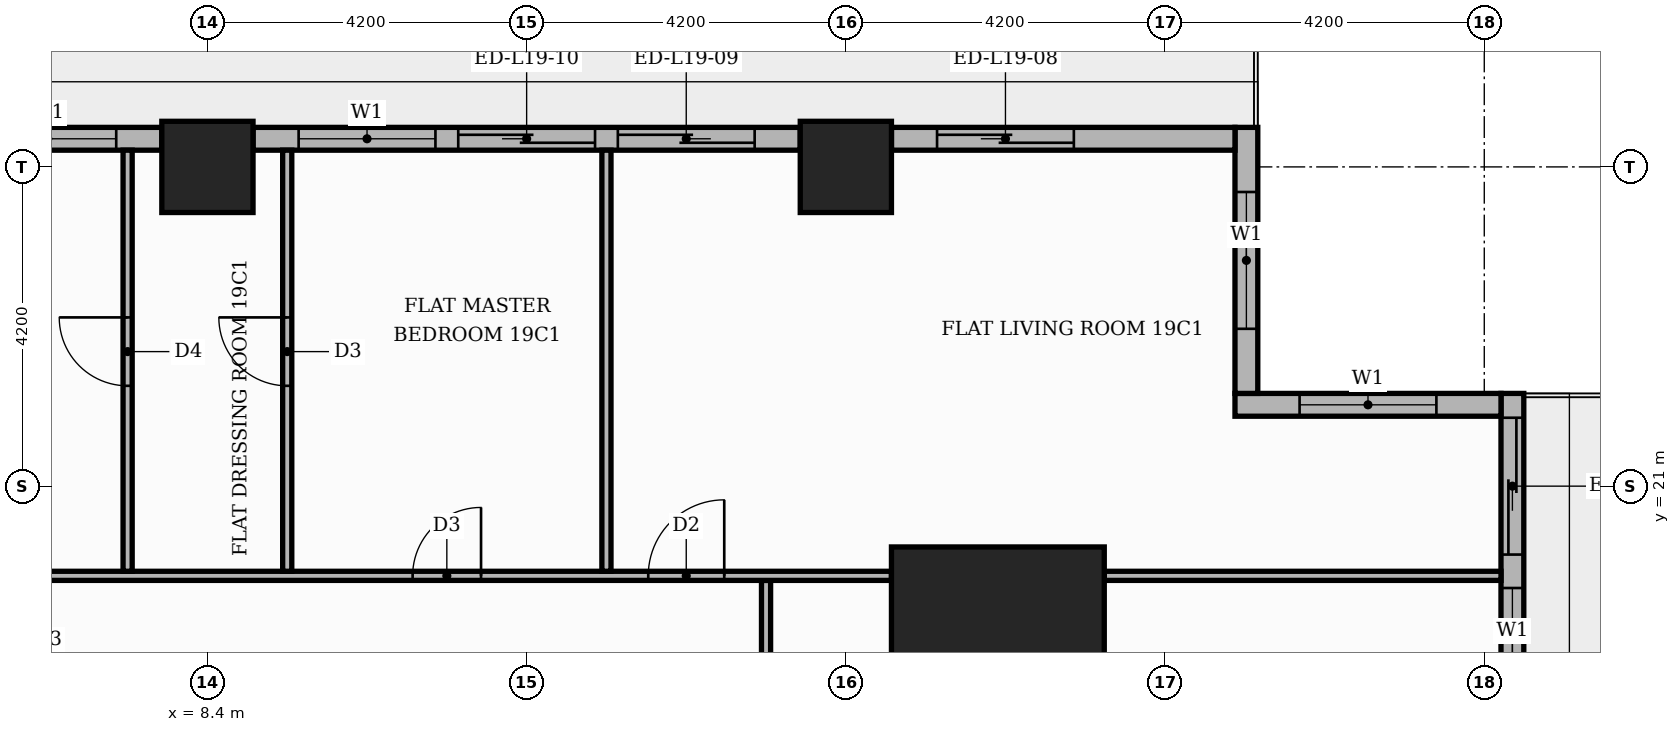
"""IFC4 building model, lengths in metres.
Left out: names, types, materials, properties, quantities, classifications, styles, units other than length and angle.
Written with IfcOpenShell. Run it as: python <this file> out.ifc"""

import sys

from ifc_helpers import new_model, si_unit, direction, frame, frame_2d, origin, origin_2d, place, context, subcontext, project, spatial, rectangle, extrude, element, fill, save


model = new_model("IFC4")
c1 = context("Model", 3, precision=1e-05, world=origin(), true_north=direction((0.0, 1.0)))
c2 = subcontext(c1, "Body", "Model", "MODEL_VIEW")
j1 = project(units=[si_unit("LENGTHUNIT", "METRE"), si_unit("PLANEANGLEUNIT", "RADIAN")], contexts=[c1])
p1 = place(None, origin())
s1 = spatial("IfcSite", under=j1, at=p1, CompositionType="ELEMENT")
p2 = place(p1, origin())
s2 = spatial("IfcBuilding", under=s1, at=p2, CompositionType="ELEMENT")
p3 = place(p2, frame((0.0, 0.0, 83.1)))
s3 = spatial("IfcBuildingStorey", under=s2, at=p3, CompositionType="ELEMENT", Elevation=83.1)
p4 = place(p3, frame((18.8, 18.8, 0.0), z_axis=(0.0, 0.0, 1.0), x_axis=(1.0, 0.0, 0.0)))
e1 = element("IfcColumn", 1, at=p4, inside=s3, PredefinedType="COLUMN", context=c2, shape_type="SweptSolid", body=[
    extrude(rectangle(XDim=2.8, YDim=2.8, at=origin_2d()), origin(), (0.0, 0.0, 1.0), 3.9),
])
for number, where, z_axis, x_axis in (
    (2, (8.4, 25.2, 0.0), (0.0, 0.0, 1.0), (1.0, 0.0, 0.0)),
    (3, (16.8, 25.2, 0.0), (0.0, 0.0, 1.0), (1.0, 0.0, 0.0)),
):
    element("IfcColumn", number, at=place(p3, frame(where, z_axis=z_axis, x_axis=x_axis)), inside=s3, PredefinedType="COLUMN", context=c2, shape_type="SweptSolid", body=[
        extrude(rectangle(XDim=1.2, YDim=1.2, at=origin_2d()), origin(), (0.0, 0.0, 1.0), 3.9),
    ])
p5 = place(p3, frame((25.57, 17.4, 0.0), z_axis=(0.0, 0.0, 1.0), x_axis=(0.0, 1.0, 0.0)))
e4 = element("IfcWall", 4, at=p5, inside=s3, PredefinedType="STANDARD", context=c2, shape_type="SweptSolid", body=[
    extrude(rectangle(XDim=4.82, YDim=0.3, at=frame_2d((2.41, 0.0))), origin(), (0.0, 0.0, 1.0), 3.48),
])
p6 = place(p5, frame((2.7, 0.0, 0.0)))
e5 = element("IfcOpeningElement", 5, at=p6, cuts=e4, PredefinedType="OPENING", context=c2, shape_type="SweptSolid", body=[
    extrude(rectangle(XDim=1.8, YDim=2.4, at=frame_2d((0.9, 1.2))), frame((0.0, 0.16, 0.0), z_axis=(0.0, -1.0, 0.0), x_axis=(1.0, 0.0, 0.0)), (0.0, 0.0, 1.0), 0.32),
])
p7 = place(p5, frame((0.46, 0.0, 0.9)))
e6 = element("IfcOpeningElement", 6, at=p7, cuts=e4, PredefinedType="OPENING", context=c2, shape_type="SweptSolid", body=[
    extrude(rectangle(XDim=1.8, YDim=2.1, at=frame_2d((0.9, 1.05))), frame((0.0, 0.16, 0.0), z_axis=(0.0, -1.0, 0.0), x_axis=(1.0, 0.0, 0.0)), (0.0, 0.0, 1.0), 0.32),
])
p8 = place(p3, frame((25.42, 22.07, 0.0), z_axis=(0.0, 0.0, 1.0), x_axis=(-1.0, 0.0, 0.0)))
e7 = element("IfcWall", 7, at=p8, inside=s3, PredefinedType="STANDARD", context=c2, shape_type="SweptSolid", body=[
    extrude(rectangle(XDim=3.5, YDim=0.3, at=frame_2d((1.75, 0.0))), origin(), (0.0, 0.0, 1.0), 3.48),
])
p9 = place(p8, frame((0.85, 0.0, 0.9)))
e8 = element("IfcOpeningElement", 8, at=p9, cuts=e7, PredefinedType="OPENING", context=c2, shape_type="SweptSolid", body=[
    extrude(rectangle(XDim=1.8, YDim=2.1, at=frame_2d((0.9, 1.05))), frame((0.0, 0.16, 0.0), z_axis=(0.0, -1.0, 0.0), x_axis=(1.0, 0.0, 0.0)), (0.0, 0.0, 1.0), 0.32),
])
p10 = place(p3, frame((22.07, 22.22, 0.0), z_axis=(0.0, 0.0, 1.0), x_axis=(0.0, 1.0, 0.0)))
e9 = element("IfcWall", 9, at=p10, inside=s3, PredefinedType="STANDARD", context=c2, shape_type="SweptSolid", body=[
    extrude(rectangle(XDim=3.5, YDim=0.3, at=frame_2d((1.75, 0.0))), origin(), (0.0, 0.0, 1.0), 3.48),
])
p11 = place(p10, frame((0.85, 0.0, 0.9)))
e10 = element("IfcOpeningElement", 10, at=p11, cuts=e9, PredefinedType="OPENING", context=c2, shape_type="SweptSolid", body=[
    extrude(rectangle(XDim=1.8, YDim=2.1, at=frame_2d((0.9, 1.05))), frame((0.0, 0.16, 0.0), z_axis=(0.0, -1.0, 0.0), x_axis=(1.0, 0.0, 0.0)), (0.0, 0.0, 1.0), 0.32),
])
p12 = place(p3, frame((21.92, 25.57, 0.0), z_axis=(0.0, 0.0, 1.0), x_axis=(-1.0, 0.0, 0.0)))
e11 = element("IfcWall", 11, at=p12, inside=s3, PredefinedType="STANDARD", context=c2, shape_type="SweptSolid", body=[
    extrude(rectangle(XDim=4.52, YDim=0.3, at=frame_2d((2.26, 0.0))), origin(), (0.0, 0.0, 1.0), 3.48),
])
p13 = place(p12, frame((2.12, 0.0, 0.0)))
e12 = element("IfcOpeningElement", 12, at=p13, cuts=e11, PredefinedType="OPENING", context=c2, shape_type="SweptSolid", body=[
    extrude(rectangle(XDim=1.8, YDim=2.4, at=frame_2d((0.9, 1.2))), frame((0.0, 0.16, 0.0), z_axis=(0.0, -1.0, 0.0), x_axis=(1.0, 0.0, 0.0)), (0.0, 0.0, 1.0), 0.32),
])
p14 = place(p3, frame((16.2, 25.57, 0.0), z_axis=(0.0, 0.0, 1.0), x_axis=(-1.0, 0.0, 0.0)))
e13 = element("IfcWall", 13, at=p14, inside=s3, PredefinedType="STANDARD", context=c2, shape_type="SweptSolid", body=[
    extrude(rectangle(XDim=7.2, YDim=0.3, at=frame_2d((3.6, 0.0))), origin(), (0.0, 0.0, 1.0), 3.48),
])
p15 = place(p14, frame((0.6, 0.0, 0.0)))
e14 = element("IfcOpeningElement", 14, at=p15, cuts=e13, PredefinedType="OPENING", context=c2, shape_type="SweptSolid", body=[
    extrude(rectangle(XDim=1.8, YDim=2.4, at=frame_2d((0.9, 1.2))), frame((0.0, 0.16, 0.0), z_axis=(0.0, -1.0, 0.0), x_axis=(1.0, 0.0, 0.0)), (0.0, 0.0, 1.0), 0.32),
])
p16 = place(p14, frame((2.7, 0.0, 0.0)))
e15 = element("IfcOpeningElement", 15, at=p16, cuts=e13, PredefinedType="OPENING", context=c2, shape_type="SweptSolid", body=[
    extrude(rectangle(XDim=1.8, YDim=2.4, at=frame_2d((0.9, 1.2))), frame((0.0, 0.16, 0.0), z_axis=(0.0, -1.0, 0.0), x_axis=(1.0, 0.0, 0.0)), (0.0, 0.0, 1.0), 0.32),
])
p17 = place(p14, frame((4.8, 0.0, 0.9)))
e16 = element("IfcOpeningElement", 16, at=p17, cuts=e13, PredefinedType="OPENING", context=c2, shape_type="SweptSolid", body=[
    extrude(rectangle(XDim=1.8, YDim=2.1, at=frame_2d((0.9, 1.05))), frame((0.0, 0.16, 0.0), z_axis=(0.0, -1.0, 0.0), x_axis=(1.0, 0.0, 0.0)), (0.0, 0.0, 1.0), 0.32),
])
p18 = place(p3, frame((7.8, 25.57, 0.0), z_axis=(0.0, 0.0, 1.0), x_axis=(-1.0, 0.0, 0.0)))
e17 = element("IfcWall", 17, at=p18, inside=s3, PredefinedType="STANDARD", context=c2, shape_type="SweptSolid", body=[
    extrude(rectangle(XDim=7.2, YDim=0.3, at=frame_2d((3.6, 0.0))), origin(), (0.0, 0.0, 1.0), 3.48),
])
p19 = place(p18, frame((0.6, 0.0, 0.9)))
e18 = element("IfcOpeningElement", 18, at=p19, cuts=e17, PredefinedType="OPENING", context=c2, shape_type="SweptSolid", body=[
    extrude(rectangle(XDim=1.8, YDim=2.1, at=frame_2d((0.9, 1.05))), frame((0.0, 0.16, 0.0), z_axis=(0.0, -1.0, 0.0), x_axis=(1.0, 0.0, 0.0)), (0.0, 0.0, 1.0), 0.32),
])
p20 = place(p18, frame((2.7, 0.0, 0.9)))
e19 = element("IfcOpeningElement", 19, at=p20, cuts=e17, PredefinedType="OPENING", context=c2, shape_type="SweptSolid", body=[
    extrude(rectangle(XDim=1.8, YDim=2.1, at=frame_2d((0.9, 1.05))), frame((0.0, 0.16, 0.0), z_axis=(0.0, -1.0, 0.0), x_axis=(1.0, 0.0, 0.0)), (0.0, 0.0, 1.0), 0.32),
])
p21 = place(p18, frame((4.8, 0.0, 0.0)))
e20 = element("IfcOpeningElement", 20, at=p21, cuts=e17, PredefinedType="OPENING", context=c2, shape_type="SweptSolid", body=[
    extrude(rectangle(XDim=1.8, YDim=2.4, at=frame_2d((0.9, 1.2))), frame((0.0, 0.16, 0.0), z_axis=(0.0, -1.0, 0.0), x_axis=(1.0, 0.0, 0.0)), (0.0, 0.0, 1.0), 0.32),
])
p22 = place(p3, frame((15.75, 13.75, 0.0), z_axis=(0.0, 0.0, 1.0), x_axis=(0.0, 1.0, 0.0)))
e21 = element("IfcWall", 21, at=p22, inside=s3, PredefinedType="PARTITIONING", context=c2, shape_type="SweptSolid", body=[
    extrude(rectangle(XDim=6.01, YDim=0.12, at=frame_2d((3.005, 0.0))), origin(), (0.0, 0.0, 1.0), 3.48),
])
p23 = place(p22, frame((2.485, 0.0, 0.0)))
e22 = element("IfcOpeningElement", 22, at=p23, cuts=e21, PredefinedType="OPENING", context=c2, shape_type="SweptSolid", body=[
    extrude(rectangle(XDim=1.0, YDim=2.1, at=frame_2d((0.5, 1.05))), frame((0.0, 0.07, 0.0), z_axis=(0.0, -1.0, 0.0), x_axis=(1.0, 0.0, 0.0)), (0.0, 0.0, 1.0), 0.14),
])
p24 = place(p3, frame((5.35, 19.82, 0.0), z_axis=(0.0, 0.0, 1.0), x_axis=(1.0, 0.0, 0.0)))
e23 = element("IfcWall", 23, at=p24, inside=s3, PredefinedType="PARTITIONING", context=c2, shape_type="SweptSolid", body=[
    extrude(rectangle(XDim=12.05, YDim=0.12, at=frame_2d((6.025, 0.0))), origin(), (0.0, 0.0, 1.0), 3.48),
])
p25 = place(p24, frame((8.85, 0.0, 0.0)))
e24 = element("IfcOpeningElement", 24, at=p25, cuts=e23, PredefinedType="OPENING", context=c2, shape_type="SweptSolid", body=[
    extrude(rectangle(XDim=1.0, YDim=2.1, at=frame_2d((0.5, 1.05))), frame((0.0, 0.07, 0.0), z_axis=(0.0, -1.0, 0.0), x_axis=(1.0, 0.0, 0.0)), (0.0, 0.0, 1.0), 0.14),
])
p26 = place(p24, frame((5.75, 0.0, 0.0)))
e25 = element("IfcOpeningElement", 25, at=p26, cuts=e23, PredefinedType="OPENING", context=c2, shape_type="SweptSolid", body=[
    extrude(rectangle(XDim=0.9, YDim=2.1, at=frame_2d((0.45, 1.05))), frame((0.0, 0.07, 0.0), z_axis=(0.0, -1.0, 0.0), x_axis=(1.0, 0.0, 0.0)), (0.0, 0.0, 1.0), 0.14),
])
p27 = place(p3, frame((20.2, 19.82, 0.0), z_axis=(0.0, 0.0, 1.0), x_axis=(1.0, 0.0, 0.0)))
e26 = element("IfcWall", 26, at=p27, inside=s3, PredefinedType="PARTITIONING", context=c2, shape_type="SweptSolid", body=[
    extrude(rectangle(XDim=5.22, YDim=0.12, at=frame_2d((2.61, 0.0))), origin(), (0.0, 0.0, 1.0), 3.48),
])
p28 = place(p3, frame((7.35, 19.88, 0.0), z_axis=(0.0, 0.0, 1.0), x_axis=(0.0, 1.0, 0.0)))
e27 = element("IfcWall", 27, at=p28, inside=s3, PredefinedType="PARTITIONING", context=c2, shape_type="SweptSolid", body=[
    extrude(rectangle(XDim=5.54, YDim=0.12, at=frame_2d((2.77, 0.0))), origin(), (0.0, 0.0, 1.0), 3.48),
])
p29 = place(p28, frame((2.44, 0.0, 0.0)))
e28 = element("IfcOpeningElement", 28, at=p29, cuts=e27, PredefinedType="OPENING", context=c2, shape_type="SweptSolid", body=[
    extrude(rectangle(XDim=0.9, YDim=2.1, at=frame_2d((0.45, 1.05))), frame((0.0, 0.07, 0.0), z_axis=(0.0, -1.0, 0.0), x_axis=(1.0, 0.0, 0.0)), (0.0, 0.0, 1.0), 0.14),
])
p30 = place(p3, frame((9.45, 19.88, 0.0), z_axis=(0.0, 0.0, 1.0), x_axis=(0.0, 1.0, 0.0)))
e29 = element("IfcWall", 29, at=p30, inside=s3, PredefinedType="PARTITIONING", context=c2, shape_type="SweptSolid", body=[
    extrude(rectangle(XDim=5.54, YDim=0.12, at=frame_2d((2.77, 0.0))), origin(), (0.0, 0.0, 1.0), 3.48),
])
p31 = place(p30, frame((2.44, 0.0, 0.0)))
e30 = element("IfcOpeningElement", 30, at=p31, cuts=e29, PredefinedType="OPENING", context=c2, shape_type="SweptSolid", body=[
    extrude(rectangle(XDim=0.9, YDim=2.1, at=frame_2d((0.45, 1.05))), frame((0.0, 0.07, 0.0), z_axis=(0.0, -1.0, 0.0), x_axis=(1.0, 0.0, 0.0)), (0.0, 0.0, 1.0), 0.14),
])
p32 = place(p3, frame((13.65, 19.88, 0.0), z_axis=(0.0, 0.0, 1.0), x_axis=(0.0, 1.0, 0.0)))
e31 = element("IfcWall", 31, at=p32, inside=s3, PredefinedType="PARTITIONING", context=c2, shape_type="SweptSolid", body=[
    extrude(rectangle(XDim=5.54, YDim=0.12, at=frame_2d((2.77, 0.0))), origin(), (0.0, 0.0, 1.0), 3.48),
])
p33 = place(p6, origin())
e32 = element("IfcDoor", 32, at=p33, inside=s3, OperationType="SLIDING_TO_LEFT", PredefinedType="DOOR", context=c2, shape_type="SweptSolid", body=[
    extrude(rectangle(XDim=1.8, YDim=2.4, at=frame_2d((0.9, 1.2))), frame((0.0, 0.025, 0.0), z_axis=(0.0, -1.0, 0.0), x_axis=(1.0, 0.0, 0.0)), (0.0, 0.0, 1.0), 0.05),
])
fill(e5, e32)
p34 = place(p7, origin())
e33 = element("IfcWindow", 33, at=p34, inside=s3, PartitioningType="SINGLE_PANEL", PredefinedType="WINDOW", context=c2, shape_type="SweptSolid", body=[
    extrude(rectangle(XDim=1.8, YDim=2.1, at=frame_2d((0.9, 1.05))), frame((0.0, 0.03, 0.0), z_axis=(0.0, -1.0, 0.0), x_axis=(1.0, 0.0, 0.0)), (0.0, 0.0, 1.0), 0.06),
])
fill(e6, e33)
p35 = place(p9, origin())
e34 = element("IfcWindow", 34, at=p35, inside=s3, PartitioningType="SINGLE_PANEL", PredefinedType="WINDOW", context=c2, shape_type="SweptSolid", body=[
    extrude(rectangle(XDim=1.8, YDim=2.1, at=frame_2d((0.9, 1.05))), frame((0.0, 0.03, 0.0), z_axis=(0.0, -1.0, 0.0), x_axis=(1.0, 0.0, 0.0)), (0.0, 0.0, 1.0), 0.06),
])
fill(e8, e34)
p36 = place(p11, origin())
e35 = element("IfcWindow", 35, at=p36, inside=s3, PartitioningType="SINGLE_PANEL", PredefinedType="WINDOW", context=c2, shape_type="SweptSolid", body=[
    extrude(rectangle(XDim=1.8, YDim=2.1, at=frame_2d((0.9, 1.05))), frame((0.0, 0.03, 0.0), z_axis=(0.0, -1.0, 0.0), x_axis=(1.0, 0.0, 0.0)), (0.0, 0.0, 1.0), 0.06),
])
fill(e10, e35)
p37 = place(p13, origin())
e36 = element("IfcDoor", 36, at=p37, inside=s3, OperationType="SLIDING_TO_RIGHT", PredefinedType="DOOR", context=c2, shape_type="SweptSolid", body=[
    extrude(rectangle(XDim=1.8, YDim=2.4, at=frame_2d((0.9, 1.2))), frame((0.0, 0.025, 0.0), z_axis=(0.0, -1.0, 0.0), x_axis=(1.0, 0.0, 0.0)), (0.0, 0.0, 1.0), 0.05),
])
fill(e12, e36)
p38 = place(p15, origin())
e37 = element("IfcDoor", 37, at=p38, inside=s3, OperationType="SLIDING_TO_LEFT", PredefinedType="DOOR", context=c2, shape_type="SweptSolid", body=[
    extrude(rectangle(XDim=1.8, YDim=2.4, at=frame_2d((0.9, 1.2))), frame((0.0, 0.025, 0.0), z_axis=(0.0, -1.0, 0.0), x_axis=(1.0, 0.0, 0.0)), (0.0, 0.0, 1.0), 0.05),
])
fill(e14, e37)
p39 = place(p16, origin())
e38 = element("IfcDoor", 38, at=p39, inside=s3, OperationType="SLIDING_TO_RIGHT", PredefinedType="DOOR", context=c2, shape_type="SweptSolid", body=[
    extrude(rectangle(XDim=1.8, YDim=2.4, at=frame_2d((0.9, 1.2))), frame((0.0, 0.025, 0.0), z_axis=(0.0, -1.0, 0.0), x_axis=(1.0, 0.0, 0.0)), (0.0, 0.0, 1.0), 0.05),
])
fill(e15, e38)
p40 = place(p17, origin())
e39 = element("IfcWindow", 39, at=p40, inside=s3, PartitioningType="SINGLE_PANEL", PredefinedType="WINDOW", context=c2, shape_type="SweptSolid", body=[
    extrude(rectangle(XDim=1.8, YDim=2.1, at=frame_2d((0.9, 1.05))), frame((0.0, 0.03, 0.0), z_axis=(0.0, -1.0, 0.0), x_axis=(1.0, 0.0, 0.0)), (0.0, 0.0, 1.0), 0.06),
])
fill(e16, e39)
p41 = place(p19, origin())
e40 = element("IfcWindow", 40, at=p41, inside=s3, PartitioningType="SINGLE_PANEL", PredefinedType="WINDOW", context=c2, shape_type="SweptSolid", body=[
    extrude(rectangle(XDim=1.8, YDim=2.1, at=frame_2d((0.9, 1.05))), frame((0.0, 0.03, 0.0), z_axis=(0.0, -1.0, 0.0), x_axis=(1.0, 0.0, 0.0)), (0.0, 0.0, 1.0), 0.06),
])
fill(e18, e40)
p42 = place(p25, origin())
e41 = element("IfcDoor", 41, at=p42, inside=s3, OperationType="SINGLE_SWING_RIGHT", PredefinedType="DOOR", context=c2, shape_type="SweptSolid", body=[
    extrude(rectangle(XDim=1.0, YDim=2.1, at=frame_2d((0.5, 1.05))), frame((0.0, 0.025, 0.0), z_axis=(0.0, -1.0, 0.0), x_axis=(1.0, 0.0, 0.0)), (0.0, 0.0, 1.0), 0.05),
])
fill(e24, e41)
p43 = place(p26, origin())
e42 = element("IfcDoor", 42, at=p43, inside=s3, OperationType="SINGLE_SWING_RIGHT", PredefinedType="DOOR", context=c2, shape_type="SweptSolid", body=[
    extrude(rectangle(XDim=0.9, YDim=2.1, at=frame_2d((0.45, 1.05))), frame((0.0, 0.025, 0.0), z_axis=(0.0, -1.0, 0.0), x_axis=(1.0, 0.0, 0.0)), (0.0, 0.0, 1.0), 0.05),
])
fill(e25, e42)
p44 = place(p31, origin())
e43 = element("IfcDoor", 43, at=p44, inside=s3, OperationType="SINGLE_SWING_RIGHT", PredefinedType="DOOR", context=c2, shape_type="SweptSolid", body=[
    extrude(rectangle(XDim=0.9, YDim=2.1, at=frame_2d((0.45, 1.05))), frame((0.0, 0.025, 0.0), z_axis=(0.0, -1.0, 0.0), x_axis=(1.0, 0.0, 0.0)), (0.0, 0.0, 1.0), 0.05),
])
fill(e30, e43)
p45 = place(p29, origin())
e44 = element("IfcDoor", 44, at=p45, inside=s3, OperationType="SINGLE_SWING_RIGHT", PredefinedType="DOOR", context=c2, shape_type="SweptSolid", body=[
    extrude(rectangle(XDim=0.9, YDim=2.1, at=frame_2d((0.45, 1.05))), frame((0.0, 0.025, 0.0), z_axis=(0.0, -1.0, 0.0), x_axis=(1.0, 0.0, 0.0)), (0.0, 0.0, 1.0), 0.05),
])
fill(e28, e44)
save(model, sys.argv[1])
